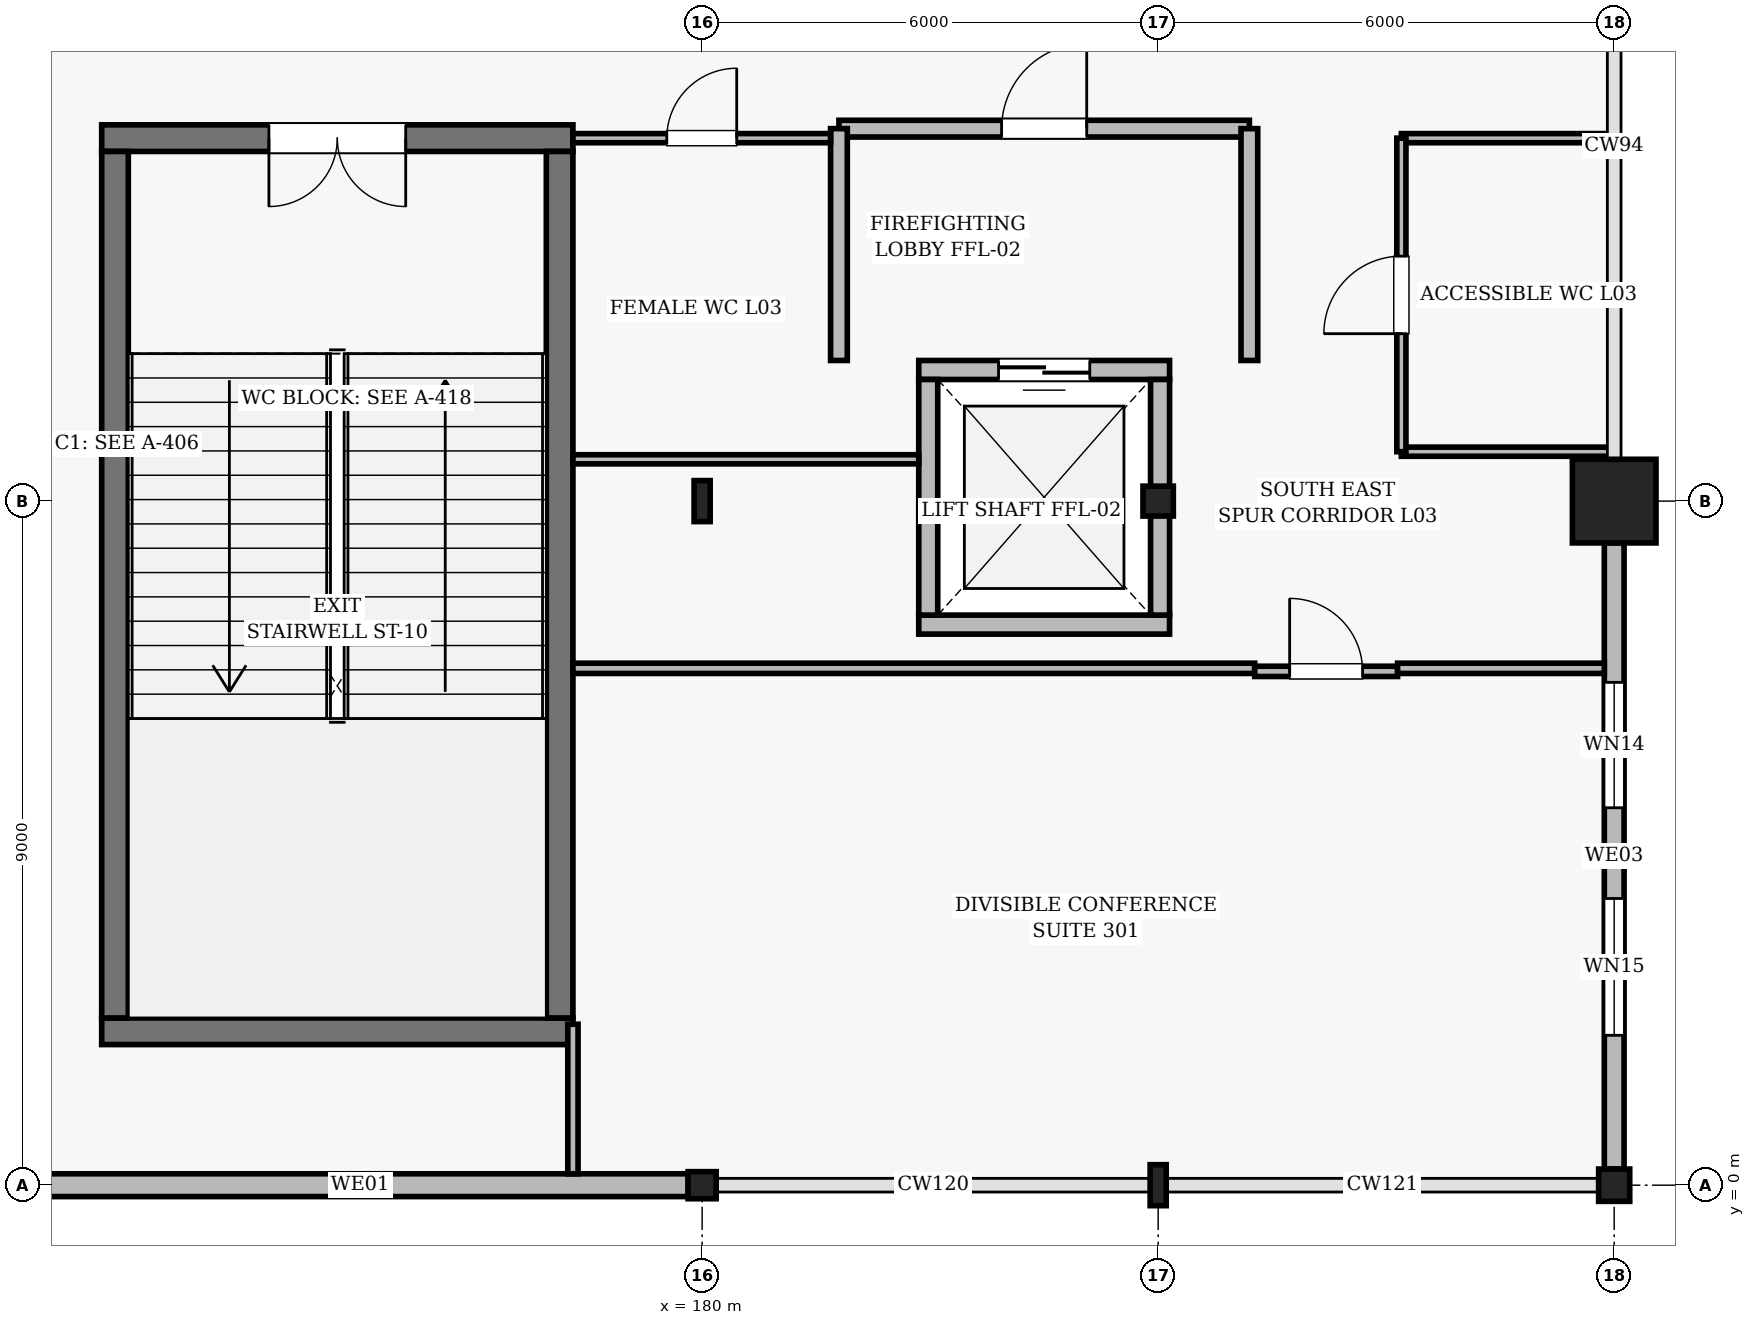
"""IFC4 building model, lengths in metres.
Left out: names, types, materials, properties, quantities, classifications, styles, units other than length and angle.
Written with IfcOpenShell. Run it as: python <this file> out.ifc"""

import sys

from ifc_helpers import new_model, si_unit, direction, frame, frame_2d, origin, origin_2d, place, context, subcontext, project, spatial, rectangle, i_section, extrude, element, fill, save


model = new_model("IFC4")
c1 = context("Model", 3, precision=1e-05, world=origin(), true_north=direction((0.0, 1.0)))
c2 = subcontext(c1, "Body", "Model", "MODEL_VIEW")
j1 = project(units=[si_unit("LENGTHUNIT", "METRE"), si_unit("PLANEANGLEUNIT", "RADIAN")], contexts=[c1])
p1 = place(None, origin())
s1 = spatial("IfcSite", under=j1, at=p1, CompositionType="ELEMENT")
p2 = place(p1, origin())
s2 = spatial("IfcBuilding", under=s1, at=p2, CompositionType="ELEMENT")
p3 = place(p2, frame((0.0, 0.0, 15.6)))
s3 = spatial("IfcBuildingStorey", under=s2, at=p3, CompositionType="ELEMENT", Elevation=15.6)
p4 = place(p3, frame((180.0, 0.0, 0.0), z_axis=(0.0, 0.0, 1.0), x_axis=(1.0, 0.0, 0.0)))
e1 = element("IfcColumn", 1, at=p4, inside=s3, PredefinedType="COLUMN", context=c2, shape_type="SweptSolid", body=[
    extrude(i_section(OverallWidth=0.369, OverallDepth=0.356, WebThickness=0.011, FlangeThickness=0.018, FilletRadius=0.015, at=origin_2d()), origin(), (0.0, 0.0, 1.0), 4.8),
])
for number, where, z_axis, x_axis in (
    (2, (180.0, 9.0, 0.0), (0.0, 0.0, 1.0), (1.0, 0.0, 0.0)),
    (3, (186.0, 0.0, 0.0), (0.0, 0.0, 1.0), (1.0, 0.0, 0.0)),
):
    element("IfcColumn", number, at=place(p3, frame(where, z_axis=z_axis, x_axis=x_axis)), inside=s3, PredefinedType="COLUMN", context=c2, shape_type="SweptSolid", body=[
        extrude(i_section(OverallWidth=0.211, OverallDepth=0.539, WebThickness=0.012, FlangeThickness=0.019, FilletRadius=0.014, at=origin_2d()), origin(), (0.0, 0.0, 1.0), 4.8),
    ])
p5 = place(p3, frame((186.0, 9.0, 0.0), z_axis=(0.0, 0.0, 1.0), x_axis=(1.0, 0.0, 0.0)))
e4 = element("IfcColumn", 4, at=p5, inside=s3, PredefinedType="COLUMN", context=c2, shape_type="SweptSolid", body=[
    extrude(i_section(OverallWidth=0.399, OverallDepth=0.393, WebThickness=0.023, FlangeThickness=0.037, FilletRadius=0.018, at=origin_2d()), origin(), (0.0, 0.0, 1.0), 4.8),
])
p6 = place(p3, frame((192.0, 0.0, 0.0), z_axis=(0.0, 0.0, 1.0), x_axis=(1.0, 0.0, 0.0)))
e5 = element("IfcColumn", 5, at=p6, inside=s3, PredefinedType="COLUMN", context=c2, shape_type="SweptSolid", body=[
    extrude(i_section(OverallWidth=0.409, OverallDepth=0.425, WebThickness=0.031, FlangeThickness=0.049, FilletRadius=0.02, at=origin_2d()), origin(), (0.0, 0.0, 1.0), 4.8),
])
p7 = place(p3, frame((192.0, 9.0, 0.0), z_axis=(0.0, 0.0, 1.0), x_axis=(1.0, 0.0, 0.0)))
e6 = element("IfcColumn", 6, at=p7, inside=s3, PredefinedType="COLUMN", context=c2, shape_type="SweptSolid", body=[
    extrude(rectangle(XDim=1.1, YDim=1.1, at=origin_2d()), origin(), (0.0, 0.0, 1.0), 4.8),
])
p8 = place(p3, frame((192.0, 8.45, 0.0), z_axis=(0.0, 0.0, 1.0), x_axis=(0.0, -1.0, 0.0)))
e7 = element("IfcWall", 7, at=p8, inside=s3, PredefinedType="SOLIDWALL", context=c2, shape_type="SweptSolid", body=[
    extrude(rectangle(XDim=8.238, YDim=0.26, at=frame_2d((4.119, 0.0))), origin(), (0.0, 0.0, 1.0), 4.046),
])
p9 = place(p8, frame((1.834, 0.0, 0.95)))
e8 = element("IfcOpeningElement", 8, at=p9, cuts=e7, PredefinedType="OPENING", context=c2, shape_type="SweptSolid", body=[
    extrude(rectangle(XDim=1.65, YDim=2.05, at=frame_2d((0.825, 1.025))), frame((0.0, 0.14, 0.0), z_axis=(0.0, -1.0, 0.0), x_axis=(1.0, 0.0, 0.0)), (0.0, 0.0, 1.0), 0.28),
])
p10 = place(p8, frame((4.678, 0.0, 0.95)))
e9 = element("IfcOpeningElement", 9, at=p10, cuts=e7, PredefinedType="OPENING", context=c2, shape_type="SweptSolid", body=[
    extrude(rectangle(XDim=1.8, YDim=2.1, at=frame_2d((0.9, 1.05))), frame((0.0, 0.14, 0.0), z_axis=(0.0, -1.0, 0.0), x_axis=(1.0, 0.0, 0.0)), (0.0, 0.0, 1.0), 0.28),
])
p11 = place(p3, frame((179.815, 0.0, 0.0), z_axis=(0.0, 0.0, 1.0), x_axis=(-1.0, 0.0, 0.0)))
e10 = element("IfcWall", 10, at=p11, inside=s3, PredefinedType="SOLIDWALL", context=c2, shape_type="SweptSolid", body=[
    extrude(rectangle(XDim=8.628, YDim=0.3, at=frame_2d((4.314, 0.0))), origin(), (0.0, 0.0, 1.0), 4.046),
])
p12 = place(p3, frame((172.1, 2.025, 0.0), z_axis=(0.0, 0.0, 1.0), x_axis=(1.0, 0.0, 0.0)))
e11 = element("IfcWall", 11, at=p12, inside=s3, PredefinedType="SHEAR", context=c2, shape_type="SweptSolid", body=[
    extrude(rectangle(XDim=6.2, YDim=0.35, at=frame_2d((3.1, 0.0))), origin(), (0.0, 0.0, 1.0), 4.6),
])
p13 = place(p3, frame((178.3, 13.775, 0.0), z_axis=(0.0, 0.0, 1.0), x_axis=(-1.0, 0.0, 0.0)))
e12 = element("IfcWall", 12, at=p13, inside=s3, PredefinedType="SHEAR", context=c2, shape_type="SweptSolid", body=[
    extrude(rectangle(XDim=6.2, YDim=0.35, at=frame_2d((3.1, 0.0))), origin(), (0.0, 0.0, 1.0), 4.6),
])
p14 = place(p13, frame((2.2, 0.0, 0.0)))
e13 = element("IfcOpeningElement", 13, at=p14, cuts=e12, PredefinedType="OPENING", context=c2, shape_type="SweptSolid", body=[
    extrude(rectangle(XDim=1.8, YDim=2.2, at=frame_2d((0.9, 1.1))), frame((0.0, 0.185, 0.0), z_axis=(0.0, -1.0, 0.0), x_axis=(1.0, 0.0, 0.0)), (0.0, 0.0, 1.0), 0.37),
])
for number, where, z_axis, x_axis in (
    (14, (172.275, 13.6, 0.0), (0.0, 0.0, 1.0), (0.0, -1.0, 0.0)),
    (15, (178.125, 2.2, 0.0), (0.0, 0.0, 1.0), (0.0, 1.0, 0.0)),
):
    element("IfcWall", number, at=place(p3, frame(where, z_axis=z_axis, x_axis=x_axis)), inside=s3, PredefinedType="SHEAR", context=c2, shape_type="SweptSolid", body=[
        extrude(rectangle(XDim=11.4, YDim=0.35, at=frame_2d((5.7, 0.0))), origin(), (0.0, 0.0, 1.0), 4.6),
    ])
p15 = place(p3, frame((182.85, 7.375, 0.0), z_axis=(0.0, 0.0, 1.0), x_axis=(1.0, 0.0, 0.0)))
e16 = element("IfcWall", 16, at=p15, inside=s3, PredefinedType="SOLIDWALL", context=c2, shape_type="SweptSolid", body=[
    extrude(rectangle(XDim=3.3, YDim=0.25, at=frame_2d((1.65, 0.0))), origin(), (0.0, 0.0, 1.0), 4.6),
])
p16 = place(p3, frame((186.15, 10.725, 0.0), z_axis=(0.0, 0.0, 1.0), x_axis=(-1.0, 0.0, 0.0)))
e17 = element("IfcWall", 17, at=p16, inside=s3, PredefinedType="SOLIDWALL", context=c2, shape_type="SweptSolid", body=[
    extrude(rectangle(XDim=3.3, YDim=0.25, at=frame_2d((1.65, 0.0))), origin(), (0.0, 0.0, 1.0), 4.6),
])
p17 = place(p16, frame((1.05, 0.0, 0.0)))
e18 = element("IfcOpeningElement", 18, at=p17, cuts=e17, PredefinedType="OPENING", context=c2, shape_type="SweptSolid", body=[
    extrude(rectangle(XDim=1.2, YDim=2.25, at=frame_2d((0.6, 1.125))), frame((0.0, 0.135, 0.0), z_axis=(0.0, -1.0, 0.0), x_axis=(1.0, 0.0, 0.0)), (0.0, 0.0, 1.0), 0.27),
])
for number, where, z_axis, x_axis in (
    (19, (182.975, 10.6, 0.0), (0.0, 0.0, 1.0), (0.0, -1.0, 0.0)),
    (20, (186.025, 7.5, 0.0), (0.0, 0.0, 1.0), (0.0, 1.0, 0.0)),
):
    element("IfcWall", number, at=place(p3, frame(where, z_axis=z_axis, x_axis=x_axis)), inside=s3, PredefinedType="SOLIDWALL", context=c2, shape_type="SweptSolid", body=[
        extrude(rectangle(XDim=3.1, YDim=0.25, at=frame_2d((1.55, 0.0))), origin(), (0.0, 0.0, 1.0), 4.6),
    ])
p18 = place(p3, frame((181.8, 13.9, 0.0), z_axis=(0.0, 0.0, 1.0), x_axis=(1.0, 0.0, 0.0)))
e21 = element("IfcWall", 21, at=p18, inside=s3, PredefinedType="SOLIDWALL", context=c2, shape_type="SweptSolid", body=[
    extrude(rectangle(XDim=5.4, YDim=0.22, at=frame_2d((2.7, 0.0))), origin(), (0.0, 0.0, 1.0), 4.6),
])
p19 = place(p18, frame((2.14, 0.0, 0.0)))
e22 = element("IfcOpeningElement", 22, at=p19, cuts=e21, PredefinedType="OPENING", context=c2, shape_type="SweptSolid", body=[
    extrude(rectangle(XDim=1.12, YDim=2.2, at=frame_2d((0.56, 1.1))), frame((0.0, 0.12, 0.0), z_axis=(0.0, -1.0, 0.0), x_axis=(1.0, 0.0, 0.0)), (0.0, 0.0, 1.0), 0.24),
])
for number, where, z_axis, x_axis in (
    (23, (181.8, 10.85, 0.0), (0.0, 0.0, 1.0), (0.0, 1.0, 0.0)),
    (24, (187.2, 10.85, 0.0), (0.0, 0.0, 1.0), (0.0, 1.0, 0.0)),
):
    element("IfcWall", number, at=place(p3, frame(where, z_axis=z_axis, x_axis=x_axis)), inside=s3, PredefinedType="SOLIDWALL", context=c2, shape_type="SweptSolid", body=[
        extrude(rectangle(XDim=3.05, YDim=0.22, at=frame_2d((1.525, 0.0))), origin(), (0.0, 0.0, 1.0), 4.6),
    ])
p20 = place(p3, frame((178.3, 13.775, 0.0), z_axis=(0.0, 0.0, 1.0), x_axis=(1.0, 0.0, 0.0)))
e25 = element("IfcWall", 25, at=p20, inside=s3, PredefinedType="PARTITIONING", context=c2, shape_type="SweptSolid", body=[
    extrude(rectangle(XDim=3.39, YDim=0.12, at=frame_2d((1.695, 0.0))), origin(), (0.0, 0.0, 1.0), 3.812),
])
p21 = place(p20, frame((1.235, 0.0, 0.0)))
e26 = element("IfcOpeningElement", 26, at=p21, cuts=e25, PredefinedType="OPENING", context=c2, shape_type="SweptSolid", body=[
    extrude(rectangle(XDim=0.92, YDim=2.12, at=frame_2d((0.46, 1.06))), frame((0.0, 0.07, 0.0), z_axis=(0.0, -1.0, 0.0), x_axis=(1.0, 0.0, 0.0)), (0.0, 0.0, 1.0), 0.14),
])
p22 = place(p3, frame((182.85, 9.55, 0.0), z_axis=(0.0, 0.0, 1.0), x_axis=(-1.0, 0.0, 0.0)))
e27 = element("IfcWall", 27, at=p22, inside=s3, PredefinedType="PARTITIONING", context=c2, shape_type="SweptSolid", body=[
    extrude(rectangle(XDim=4.55, YDim=0.12, at=frame_2d((2.275, 0.0))), origin(), (0.0, 0.0, 1.0), 3.812),
])
for number, where, z_axis, x_axis in (
    (28, (189.2, 13.775, 0.0), (0.0, 0.0, 1.0), (1.0, 0.0, 0.0)),
    (29, (191.988, 9.65, 0.0), (0.0, 0.0, 1.0), (-1.0, 0.0, 0.0)),
):
    element("IfcWall", number, at=place(p3, frame(where, z_axis=z_axis, x_axis=x_axis)), inside=s3, PredefinedType="PARTITIONING", context=c2, shape_type="SweptSolid", body=[
        extrude(rectangle(XDim=2.788, YDim=0.12, at=frame_2d((1.394, 0.0))), origin(), (0.0, 0.0, 1.0), 4.119),
    ])
p23 = place(p3, frame((189.2, 9.65, 0.0), z_axis=(0.0, 0.0, 1.0), x_axis=(0.0, 1.0, 0.0)))
e30 = element("IfcWall", 30, at=p23, inside=s3, PredefinedType="PARTITIONING", context=c2, shape_type="SweptSolid", body=[
    extrude(rectangle(XDim=4.125, YDim=0.12, at=frame_2d((2.062, 0.0))), origin(), (0.0, 0.0, 1.0), 4.6),
])
p24 = place(p23, frame((1.552, 0.0, 0.0)))
e31 = element("IfcOpeningElement", 31, at=p24, cuts=e30, PredefinedType="OPENING", context=c2, shape_type="SweptSolid", body=[
    extrude(rectangle(XDim=1.02, YDim=2.16, at=frame_2d((0.51, 1.08))), frame((0.0, 0.07, 0.0), z_axis=(0.0, -1.0, 0.0), x_axis=(1.0, 0.0, 0.0)), (0.0, 0.0, 1.0), 0.14),
])
p25 = place(p3, frame((178.3, 6.8, 0.0), z_axis=(0.0, 0.0, 1.0), x_axis=(1.0, 0.0, 0.0)))
e32 = element("IfcWall", 32, at=p25, inside=s3, PredefinedType="PARTITIONING", context=c2, shape_type="SweptSolid", body=[
    extrude(rectangle(XDim=8.97, YDim=0.135, at=frame_2d((4.485, 0.0))), origin(), (0.0, 0.0, 1.0), 3.974),
])
p26 = place(p3, frame((187.27, 6.76, 0.0), z_axis=(0.0, 0.0, 1.0), x_axis=(1.0, 0.0, 0.0)))
e33 = element("IfcWall", 33, at=p26, inside=s3, PredefinedType="PARTITIONING", context=c2, shape_type="SweptSolid", body=[
    extrude(rectangle(XDim=1.88, YDim=0.135, at=frame_2d((0.94, 0.0))), origin(), (0.0, 0.0, 1.0), 4.6),
])
p27 = place(p26, frame((0.46, 0.0, 0.0)))
e34 = element("IfcOpeningElement", 34, at=p27, cuts=e33, PredefinedType="OPENING", context=c2, shape_type="SweptSolid", body=[
    extrude(rectangle(XDim=0.96, YDim=2.15, at=frame_2d((0.48, 1.075))), frame((0.0, 0.078, 0.0), z_axis=(0.0, -1.0, 0.0), x_axis=(1.0, 0.0, 0.0)), (0.0, 0.0, 1.0), 0.155),
])
p28 = place(p3, frame((189.15, 6.8, 0.0), z_axis=(0.0, 0.0, 1.0), x_axis=(1.0, 0.0, 0.0)))
e35 = element("IfcWall", 35, at=p28, inside=s3, PredefinedType="PARTITIONING", context=c2, shape_type="SweptSolid", body=[
    extrude(rectangle(XDim=2.72, YDim=0.135, at=frame_2d((1.36, 0.0))), origin(), (0.0, 0.0, 1.0), 4.046),
])
p29 = place(p3, frame((178.3, 0.15, 0.0), z_axis=(0.0, 0.0, 1.0), x_axis=(0.0, 1.0, 0.0)))
e36 = element("IfcWall", 36, at=p29, inside=s3, PredefinedType="PARTITIONING", context=c2, shape_type="SweptSolid", body=[
    extrude(rectangle(XDim=1.968, YDim=0.135, at=frame_2d((0.984, 0.0))), origin(), (0.0, 0.0, 1.0), 4.046),
])
p30 = place(p9, origin())
e37 = element("IfcWindow", 37, at=p30, inside=s3, PartitioningType="SINGLE_PANEL", PredefinedType="WINDOW", context=c2, shape_type="SweptSolid", body=[
    extrude(rectangle(XDim=1.65, YDim=2.05, at=frame_2d((0.825, 1.025))), frame((0.0, 0.03, 0.0), z_axis=(0.0, -1.0, 0.0), x_axis=(1.0, 0.0, 0.0)), (0.0, 0.0, 1.0), 0.06),
])
fill(e8, e37)
p31 = place(p10, origin())
e38 = element("IfcWindow", 38, at=p31, inside=s3, PartitioningType="SINGLE_PANEL", PredefinedType="WINDOW", context=c2, shape_type="SweptSolid", body=[
    extrude(rectangle(XDim=1.8, YDim=2.1, at=frame_2d((0.9, 1.05))), frame((0.0, 0.03, 0.0), z_axis=(0.0, -1.0, 0.0), x_axis=(1.0, 0.0, 0.0)), (0.0, 0.0, 1.0), 0.06),
])
fill(e9, e38)
p32 = place(p14, origin())
e39 = element("IfcDoor", 39, at=p32, inside=s3, OperationType="DOUBLE_DOOR_SINGLE_SWING", PredefinedType="DOOR", context=c2, shape_type="SweptSolid", body=[
    extrude(rectangle(XDim=1.8, YDim=2.2, at=frame_2d((0.9, 1.1))), frame((0.0, 0.025, 0.0), z_axis=(0.0, -1.0, 0.0), x_axis=(1.0, 0.0, 0.0)), (0.0, 0.0, 1.0), 0.05),
])
fill(e13, e39)
p33 = place(p17, origin())
e40 = element("IfcDoor", 40, at=p33, inside=s3, OperationType="DOUBLE_DOOR_SLIDING", PredefinedType="DOOR", context=c2, shape_type="SweptSolid", body=[
    extrude(rectangle(XDim=1.2, YDim=2.25, at=frame_2d((0.6, 1.125))), frame((0.0, 0.025, 0.0), z_axis=(0.0, -1.0, 0.0), x_axis=(1.0, 0.0, 0.0)), (0.0, 0.0, 1.0), 0.05),
])
fill(e18, e40)
p34 = place(p19, origin())
e41 = element("IfcDoor", 41, at=p34, inside=s3, OperationType="SINGLE_SWING_RIGHT", PredefinedType="DOOR", context=c2, shape_type="SweptSolid", body=[
    extrude(rectangle(XDim=1.12, YDim=2.2, at=frame_2d((0.56, 1.1))), frame((0.0, 0.025, 0.0), z_axis=(0.0, -1.0, 0.0), x_axis=(1.0, 0.0, 0.0)), (0.0, 0.0, 1.0), 0.05),
])
fill(e22, e41)
p35 = place(p21, origin())
e42 = element("IfcDoor", 42, at=p35, inside=s3, OperationType="SINGLE_SWING_RIGHT", PredefinedType="DOOR", context=c2, shape_type="SweptSolid", body=[
    extrude(rectangle(XDim=0.92, YDim=2.12, at=frame_2d((0.46, 1.06))), frame((0.0, 0.025, 0.0), z_axis=(0.0, -1.0, 0.0), x_axis=(1.0, 0.0, 0.0)), (0.0, 0.0, 1.0), 0.05),
])
fill(e26, e42)
p36 = place(p24, origin())
e43 = element("IfcDoor", 43, at=p36, inside=s3, OperationType="SINGLE_SWING_LEFT", PredefinedType="DOOR", context=c2, shape_type="SweptSolid", body=[
    extrude(rectangle(XDim=1.02, YDim=2.16, at=frame_2d((0.51, 1.08))), frame((0.0, 0.025, 0.0), z_axis=(0.0, -1.0, 0.0), x_axis=(1.0, 0.0, 0.0)), (0.0, 0.0, 1.0), 0.05),
])
fill(e31, e43)
p37 = place(p27, origin())
e44 = element("IfcDoor", 44, at=p37, inside=s3, OperationType="SINGLE_SWING_LEFT", PredefinedType="DOOR", context=c2, shape_type="SweptSolid", body=[
    extrude(rectangle(XDim=0.96, YDim=2.15, at=frame_2d((0.48, 1.075))), frame((0.0, 0.025, 0.0), z_axis=(0.0, -1.0, 0.0), x_axis=(1.0, 0.0, 0.0)), (0.0, 0.0, 1.0), 0.05),
])
fill(e34, e44)
save(model, sys.argv[1])
